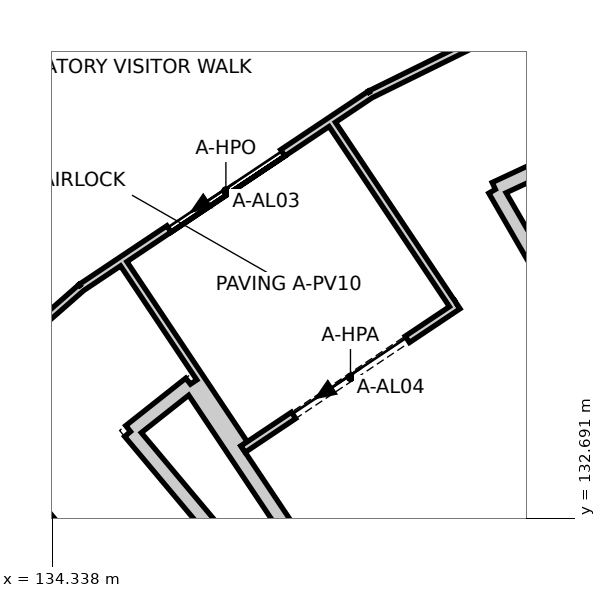
"""IFC4 building model, lengths in metres.
Left out: names, types, materials, properties, quantities, classifications, styles, units other than length and angle.
Written with IfcOpenShell. Run it as: python <this file> out.ifc"""

import sys

from ifc_helpers import new_model, si_unit, direction, frame, frame_2d, origin, place, context, subcontext, project, spatial, polyline, rectangle, outline, extrude, element, fill, save


model = new_model("IFC4")
c1 = context("Model", 3, precision=1e-05, world=origin(), true_north=direction((0.0, 1.0)))
c2 = subcontext(c1, "Body", "Model", "MODEL_VIEW")
j1 = project(units=[si_unit("LENGTHUNIT", "METRE"), si_unit("PLANEANGLEUNIT", "RADIAN")], contexts=[c1])
p1 = place(None, origin())
s1 = spatial("IfcSite", under=j1, at=p1, CompositionType="ELEMENT")
p2 = place(p1, origin())
s2 = spatial("IfcBuilding", under=s1, at=p2, CompositionType="ELEMENT")
p3 = place(p2, origin())
s3 = spatial("IfcBuildingStorey", under=s2, at=p3, CompositionType="ELEMENT", Elevation=0.0)
p4 = place(p3, frame((142.625, 140.29, 0.0), z_axis=(0.0, 0.0, 1.0), x_axis=(-0.896870290184, -0.442293661028, 0.0)))
e1 = element("IfcWall", 1, at=p4, inside=s3, PredefinedType="PARTITIONING", context=c2, shape_type="SweptSolid", body=[
    extrude(outline(polyline([(-0.003, -0.05), (4.575, -0.05), (4.568, 0.05), (0.003, 0.05), (-0.003, -0.05)])), origin(), (0.0, 0.0, 1.0), 10.841),
])
p5 = place(p3, frame((138.525, 138.268, 0.0), z_axis=(0.0, 0.0, 1.0), x_axis=(-0.831458299113, -0.555587164031, 0.0)))
e2 = element("IfcWall", 2, at=p5, inside=s3, PredefinedType="PARTITIONING", context=c2, shape_type="SweptSolid", body=[
    extrude(outline(polyline([(-0.003, -0.05), (4.575, -0.05), (4.569, 0.05), (0.003, 0.05), (-0.003, -0.05)])), origin(), (0.0, 0.0, 1.0), 10.842),
])
p6 = place(p5, frame((1.386, 0.0, 0.0)))
e3 = element("IfcOpeningElement", 3, at=p6, cuts=e2, PredefinedType="OPENING", context=c2, shape_type="SweptSolid", body=[
    extrude(rectangle(XDim=1.8, YDim=2.4, at=frame_2d((0.9, 1.2))), frame((0.0, 0.06, 0.0), z_axis=(0.0, -1.0, 0.0), x_axis=(1.0, 0.0, 0.0)), (0.0, 0.0, 1.0), 0.12),
])
p7 = place(p3, frame((134.724, 135.728, 0.0), z_axis=(0.0, 0.0, 1.0), x_axis=(-0.751864999433, -0.659317088075, 0.0)))
e4 = element("IfcWall", 4, at=p7, inside=s3, PredefinedType="PARTITIONING", context=c2, shape_type="SweptSolid", body=[
    extrude(outline(polyline([(-0.003, -0.05), (4.575, -0.05), (4.568, 0.05), (0.003, 0.05), (-0.003, -0.05)])), origin(), (0.0, 0.0, 1.0), 10.842),
])
p8 = place(p3, frame((138.024, 137.873, 0.0), z_axis=(0.0, 0.0, 1.0), x_axis=(0.555569638572, -0.8314700095, 0.0)))
e5 = element("IfcWall", 5, at=p8, inside=s3, PredefinedType="PARTITIONING", context=c2, shape_type="SweptSolid", body=[
    extrude(rectangle(XDim=2.85, YDim=0.1, at=frame_2d((1.425, 0.0))), origin(), (0.0, 0.0, 1.0), 3.0),
])
p9 = place(p3, frame((135.28, 136.039, 0.0), z_axis=(0.0, 0.0, 1.0), x_axis=(0.555609208993, -0.831443568068, 0.0)))
e6 = element("IfcWall", 6, at=p9, inside=s3, PredefinedType="PARTITIONING", context=c2, shape_type="SweptSolid", body=[
    extrude(rectangle(XDim=2.85, YDim=0.1, at=frame_2d((1.425, 0.0))), origin(), (0.0, 0.0, 1.0), 3.0),
])
p10 = place(p3, frame((139.677, 135.489, 0.0), z_axis=(0.0, 0.0, 1.0), x_axis=(-0.831464319789, -0.555578153744, 0.0)))
e7 = element("IfcWall", 7, at=p10, inside=s3, PredefinedType="PARTITIONING", context=c2, shape_type="SweptSolid", body=[
    extrude(rectangle(XDim=3.4, YDim=0.1, at=frame_2d((1.7, 0.0))), origin(), (0.0, 0.0, 1.0), 3.0),
])
p11 = place(p10, frame((0.8, 0.0, 0.0)))
e8 = element("IfcOpeningElement", 8, at=p11, cuts=e7, PredefinedType="OPENING", context=c2, shape_type="SweptSolid", body=[
    extrude(rectangle(XDim=1.8, YDim=2.4, at=frame_2d((0.9, 1.2))), frame((0.0, 0.06, 0.0), z_axis=(0.0, -1.0, 0.0), x_axis=(1.0, 0.0, 0.0)), (0.0, 0.0, 1.0), 0.12),
])
p12 = place(p3, frame((143.947, 138.777, 0.0), z_axis=(0.0, 0.0, 1.0), x_axis=(-0.906506273422, -0.422192345082, 0.0)))
e9 = element("IfcWall", 9, at=p12, inside=s3, PredefinedType="SOLIDWALL", context=c2, shape_type="SweptSolid", body=[
    extrude(outline(polyline([(-0.109, -0.1), (4.275, -0.1), (4.057, 0.1), (0.109, 0.1), (-0.109, -0.1)])), origin(), (0.0, 0.0, 1.0), 0.6),
])
p13 = place(p3, frame((140.17, 137.018, 0.0), z_axis=(0.0, 0.0, 1.0), x_axis=(0.49998601522, -0.866033477751, 0.0)))
e10 = element("IfcWall", 10, at=p13, inside=s3, PredefinedType="SOLIDWALL", context=c2, shape_type="SweptSolid", body=[
    extrude(outline(polyline([(-0.109, -0.1), (5.491, -0.1), (5.307, 0.1), (0.109, 0.1), (-0.109, -0.1)])), origin(), (0.0, 0.0, 1.0), 0.6),
])
p14 = place(p3, frame((136.158, 134.456, 0.0), z_axis=(0.0, 0.0, 1.0), x_axis=(-0.784242597729, -0.620454307671, 0.0)))
e11 = element("IfcWall", 11, at=p14, inside=s3, PredefinedType="SOLIDWALL", context=c2, shape_type="SweptSolid", body=[
    extrude(outline(polyline([(-0.108, -0.1), (1.109, -0.1), (0.903, 0.1), (0.108, 0.1), (-0.108, -0.1)])), origin(), (0.0, 0.0, 1.0), 0.6),
])
p15 = place(p3, frame((135.369, 133.831, 0.0), z_axis=(0.0, 0.0, 1.0), x_axis=(0.642794283986, -0.766038842667, 0.0)))
e12 = element("IfcWall", 12, at=p15, inside=s3, PredefinedType="SOLIDWALL", context=c2, shape_type="SweptSolid", body=[
    extrude(outline(polyline([(-0.103, -0.1), (5.487, -0.1), (5.282, 0.1), (0.103, 0.1), (-0.103, -0.1)])), origin(), (0.0, 0.0, 1.0), 0.6),
])
p16 = place(p3, frame((139.146, 129.984, 0.0), z_axis=(0.0, 0.0, 1.0), x_axis=(-0.555590320433, 0.831456189971, 0.0)))
e13 = element("IfcWall", 13, at=p16, inside=s3, PredefinedType="SOLIDWALL", context=c2, shape_type="SweptSolid", body=[
    extrude(outline(polyline([(-0.088, -0.1), (5.487, -0.1), (5.27, 0.1), (0.088, 0.1), (-0.088, -0.1)])), origin(), (0.0, 0.0, 1.0), 0.6),
])
p17 = place(p3, frame((137.631, 128.647, 0.0), z_axis=(0.0, 0.0, 1.0), x_axis=(-0.642762204395, 0.766065759972, 0.0)))
e14 = element("IfcWall", 14, at=p17, inside=s3, PredefinedType="SOLIDWALL", context=c2, shape_type="SweptSolid", body=[
    extrude(outline(polyline([(-0.092, -0.1), (5.498, -0.1), (5.293, 0.1), (0.092, 0.1), (-0.092, -0.1)])), origin(), (0.0, 0.0, 1.0), 0.6),
])
p18 = place(p6, origin())
e15 = element("IfcDoor", 15, at=p18, inside=s3, OperationType="DOUBLE_DOOR_SLIDING", PredefinedType="DOOR", context=c2, shape_type="SweptSolid", body=[
    extrude(rectangle(XDim=1.8, YDim=2.4, at=frame_2d((0.9, 1.2))), frame((0.0, 0.025, 0.0), z_axis=(0.0, -1.0, 0.0), x_axis=(1.0, 0.0, 0.0)), (0.0, 0.0, 1.0), 0.05),
])
fill(e3, e15)
p19 = place(p11, origin())
e16 = element("IfcDoor", 16, at=p19, inside=s3, OperationType="DOUBLE_DOOR_SLIDING", PredefinedType="DOOR", context=c2, shape_type="SweptSolid", body=[
    extrude(rectangle(XDim=1.8, YDim=2.4, at=frame_2d((0.9, 1.2))), frame((0.0, 0.025, 0.0), z_axis=(0.0, -1.0, 0.0), x_axis=(1.0, 0.0, 0.0)), (0.0, 0.0, 1.0), 0.05),
])
fill(e8, e16)
save(model, sys.argv[1])
